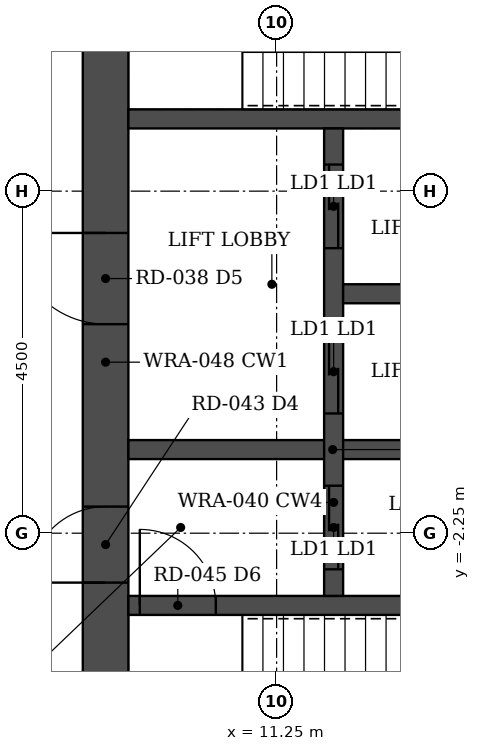
"""IFC4 building model, lengths in metres.
Left out: names, types, materials, properties, quantities, classifications, styles, units other than length and angle.
Written with IfcOpenShell. Run it as: python <this file> out.ifc"""

import sys

from ifc_helpers import new_model, si_unit, direction, frame, frame_2d, origin, place, context, subcontext, project, spatial, rectangle, extrude, element, fill, save


model = new_model("IFC4")
c1 = context("Model", 3, precision=1e-05, world=origin(), true_north=direction((0.0, 1.0)))
c2 = subcontext(c1, "Body", "Model", "MODEL_VIEW")
j1 = project(units=[si_unit("LENGTHUNIT", "METRE"), si_unit("PLANEANGLEUNIT", "RADIAN")], contexts=[c1])
p1 = place(None, origin())
s1 = spatial("IfcSite", under=j1, at=p1, CompositionType="ELEMENT")
p2 = place(p1, origin())
s2 = spatial("IfcBuilding", under=s1, at=p2, CompositionType="ELEMENT")
p3 = place(p2, frame((0.0, 0.0, 58.0)))
s3 = spatial("IfcBuildingStorey", under=s2, at=p3, CompositionType="ELEMENT", Elevation=58.0)
p4 = place(p3, frame((9.0, -6.45, 0.0), z_axis=(0.0, 0.0, 1.0), x_axis=(0.0, 1.0, 0.0)))
e1 = element("IfcWall", 1, at=p4, inside=s3, PredefinedType="SHEAR", context=c2, shape_type="SweptSolid", body=[
    extrude(rectangle(XDim=12.9, YDim=0.6, at=frame_2d((6.45, 0.0))), origin(), (0.0, 0.0, 1.0), 3.5),
])
p5 = place(p4, frame((3.55, 0.0, 0.0)))
e2 = element("IfcOpeningElement", 2, at=p5, cuts=e1, PredefinedType="OPENING", context=c2, shape_type="SweptSolid", body=[
    extrude(rectangle(XDim=1.0, YDim=2.1, at=frame_2d((0.5, 1.05))), frame((0.0, 0.31, 0.0), z_axis=(0.0, -1.0, 0.0), x_axis=(1.0, 0.0, 0.0)), (0.0, 0.0, 1.0), 0.62),
])
p6 = place(p4, frame((6.95, 0.0, 0.0)))
e3 = element("IfcOpeningElement", 3, at=p6, cuts=e1, PredefinedType="OPENING", context=c2, shape_type="SweptSolid", body=[
    extrude(rectangle(XDim=1.2, YDim=2.1, at=frame_2d((0.6, 1.05))), frame((0.0, 0.31, 0.0), z_axis=(0.0, -1.0, 0.0), x_axis=(1.0, 0.0, 0.0)), (0.0, 0.0, 1.0), 0.62),
])
p7 = place(p4, frame((10.85, 0.0, 0.0)))
e4 = element("IfcOpeningElement", 4, at=p7, cuts=e1, PredefinedType="OPENING", context=c2, shape_type="SweptSolid", body=[
    extrude(rectangle(XDim=1.0, YDim=2.1, at=frame_2d((0.5, 1.05))), frame((0.0, 0.31, 0.0), z_axis=(0.0, -1.0, 0.0), x_axis=(1.0, 0.0, 0.0)), (0.0, 0.0, 1.0), 0.62),
])
p8 = place(p3, frame((9.3, -3.2, 0.0), z_axis=(0.0, 0.0, 1.0), x_axis=(1.0, 0.0, 0.0)))
e5 = element("IfcWall", 5, at=p8, inside=s3, PredefinedType="SHEAR", context=c2, shape_type="SweptSolid", body=[
    extrude(rectangle(XDim=8.4, YDim=0.25, at=frame_2d((4.2, 0.0))), origin(), (0.0, 0.0, 1.0), 3.5),
])
p9 = place(p8, frame((0.15, 0.0, 0.0)))
e6 = element("IfcOpeningElement", 6, at=p9, cuts=e5, PredefinedType="OPENING", context=c2, shape_type="SweptSolid", body=[
    extrude(rectangle(XDim=1.0, YDim=2.1, at=frame_2d((0.5, 1.05))), frame((0.0, 0.135, 0.0), z_axis=(0.0, -1.0, 0.0), x_axis=(1.0, 0.0, 0.0)), (0.0, 0.0, 1.0), 0.27),
])
p10 = place(p3, frame((9.3, 3.2, 0.0), z_axis=(0.0, 0.0, 1.0), x_axis=(1.0, 0.0, 0.0)))
e7 = element("IfcWall", 7, at=p10, inside=s3, PredefinedType="SHEAR", context=c2, shape_type="SweptSolid", body=[
    extrude(rectangle(XDim=8.4, YDim=0.25, at=frame_2d((4.2, 0.0))), origin(), (0.0, 0.0, 1.0), 3.5),
])
p11 = place(p3, frame((9.3, -1.15, 0.0), z_axis=(0.0, 0.0, 1.0), x_axis=(1.0, 0.0, 0.0)))
e8 = element("IfcWall", 8, at=p11, inside=s3, PredefinedType="SHEAR", context=c2, shape_type="SweptSolid", body=[
    extrude(rectangle(XDim=5.375, YDim=0.25, at=frame_2d((2.688, 0.0))), origin(), (0.0, 0.0, 1.0), 3.5),
])
p12 = place(p3, frame((12.0, -3.075, 0.0), z_axis=(0.0, 0.0, 1.0), x_axis=(0.0, 1.0, 0.0)))
e9 = element("IfcWall", 9, at=p12, inside=s3, PredefinedType="SHEAR", context=c2, shape_type="SweptSolid", body=[
    extrude(rectangle(XDim=6.15, YDim=0.25, at=frame_2d((3.075, 0.0))), origin(), (0.0, 0.0, 1.0), 3.5),
])
p13 = place(p12, frame((0.35, 0.0, 0.0)))
e10 = element("IfcOpeningElement", 10, at=p13, cuts=e9, PredefinedType="OPENING", context=c2, shape_type="SweptSolid", body=[
    extrude(rectangle(XDim=1.1, YDim=2.1, at=frame_2d((0.55, 1.05))), frame((0.0, 0.135, 0.0), z_axis=(0.0, -1.0, 0.0), x_axis=(1.0, 0.0, 0.0)), (0.0, 0.0, 1.0), 0.27),
])
p14 = place(p12, frame((2.4, 0.0, 0.0)))
e11 = element("IfcOpeningElement", 11, at=p14, cuts=e9, PredefinedType="OPENING", context=c2, shape_type="SweptSolid", body=[
    extrude(rectangle(XDim=1.1, YDim=2.1, at=frame_2d((0.55, 1.05))), frame((0.0, 0.135, 0.0), z_axis=(0.0, -1.0, 0.0), x_axis=(1.0, 0.0, 0.0)), (0.0, 0.0, 1.0), 0.27),
])
p15 = place(p12, frame((4.575, 0.0, 0.0)))
e12 = element("IfcOpeningElement", 12, at=p15, cuts=e9, PredefinedType="OPENING", context=c2, shape_type="SweptSolid", body=[
    extrude(rectangle(XDim=1.1, YDim=2.1, at=frame_2d((0.55, 1.05))), frame((0.0, 0.135, 0.0), z_axis=(0.0, -1.0, 0.0), x_axis=(1.0, 0.0, 0.0)), (0.0, 0.0, 1.0), 0.27),
])
p16 = place(p3, frame((12.125, 0.9, 0.0), z_axis=(0.0, 0.0, 1.0), x_axis=(1.0, 0.0, 0.0)))
e13 = element("IfcWall", 13, at=p16, inside=s3, PredefinedType="SHEAR", context=c2, shape_type="SweptSolid", body=[
    extrude(rectangle(XDim=2.55, YDim=0.25, at=frame_2d((1.275, 0.0))), origin(), (0.0, 0.0, 1.0), 3.5),
])
p17 = place(p5, origin())
e14 = element("IfcDoor", 14, at=p17, inside=s3, OperationType="SINGLE_SWING_LEFT", PredefinedType="DOOR", context=c2, shape_type="SweptSolid", body=[
    extrude(rectangle(XDim=1.0, YDim=2.1, at=frame_2d((0.5, 1.05))), frame((0.0, 0.025, 0.0), z_axis=(0.0, -1.0, 0.0), x_axis=(1.0, 0.0, 0.0)), (0.0, 0.0, 1.0), 0.05),
])
fill(e2, e14)
p18 = place(p9, origin())
e15 = element("IfcDoor", 15, at=p18, inside=s3, OperationType="SINGLE_SWING_LEFT", PredefinedType="DOOR", context=c2, shape_type="SweptSolid", body=[
    extrude(rectangle(XDim=1.0, YDim=2.1, at=frame_2d((0.5, 1.05))), frame((0.0, 0.025, 0.0), z_axis=(0.0, -1.0, 0.0), x_axis=(1.0, 0.0, 0.0)), (0.0, 0.0, 1.0), 0.05),
])
fill(e6, e15)
p19 = place(p6, origin())
e16 = element("IfcDoor", 16, at=p19, inside=s3, OperationType="SINGLE_SWING_RIGHT", PredefinedType="DOOR", context=c2, shape_type="SweptSolid", body=[
    extrude(rectangle(XDim=1.2, YDim=2.1, at=frame_2d((0.6, 1.05))), frame((0.0, 0.025, 0.0), z_axis=(0.0, -1.0, 0.0), x_axis=(1.0, 0.0, 0.0)), (0.0, 0.0, 1.0), 0.05),
])
fill(e3, e16)
p20 = place(p13, origin())
e17 = element("IfcDoor", 17, at=p20, inside=s3, OperationType="DOUBLE_DOOR_SLIDING", PredefinedType="DOOR", context=c2, shape_type="SweptSolid", body=[
    extrude(rectangle(XDim=1.1, YDim=2.1, at=frame_2d((0.55, 1.05))), frame((0.0, 0.025, 0.0), z_axis=(0.0, -1.0, 0.0), x_axis=(1.0, 0.0, 0.0)), (0.0, 0.0, 1.0), 0.05),
])
fill(e10, e17)
p21 = place(p14, origin())
e18 = element("IfcDoor", 18, at=p21, inside=s3, OperationType="DOUBLE_DOOR_SLIDING", PredefinedType="DOOR", context=c2, shape_type="SweptSolid", body=[
    extrude(rectangle(XDim=1.1, YDim=2.1, at=frame_2d((0.55, 1.05))), frame((0.0, 0.025, 0.0), z_axis=(0.0, -1.0, 0.0), x_axis=(1.0, 0.0, 0.0)), (0.0, 0.0, 1.0), 0.05),
])
fill(e11, e18)
p22 = place(p15, origin())
e19 = element("IfcDoor", 19, at=p22, inside=s3, OperationType="DOUBLE_DOOR_SLIDING", PredefinedType="DOOR", context=c2, shape_type="SweptSolid", body=[
    extrude(rectangle(XDim=1.1, YDim=2.1, at=frame_2d((0.55, 1.05))), frame((0.0, 0.025, 0.0), z_axis=(0.0, -1.0, 0.0), x_axis=(1.0, 0.0, 0.0)), (0.0, 0.0, 1.0), 0.05),
])
fill(e12, e19)
save(model, sys.argv[1])
